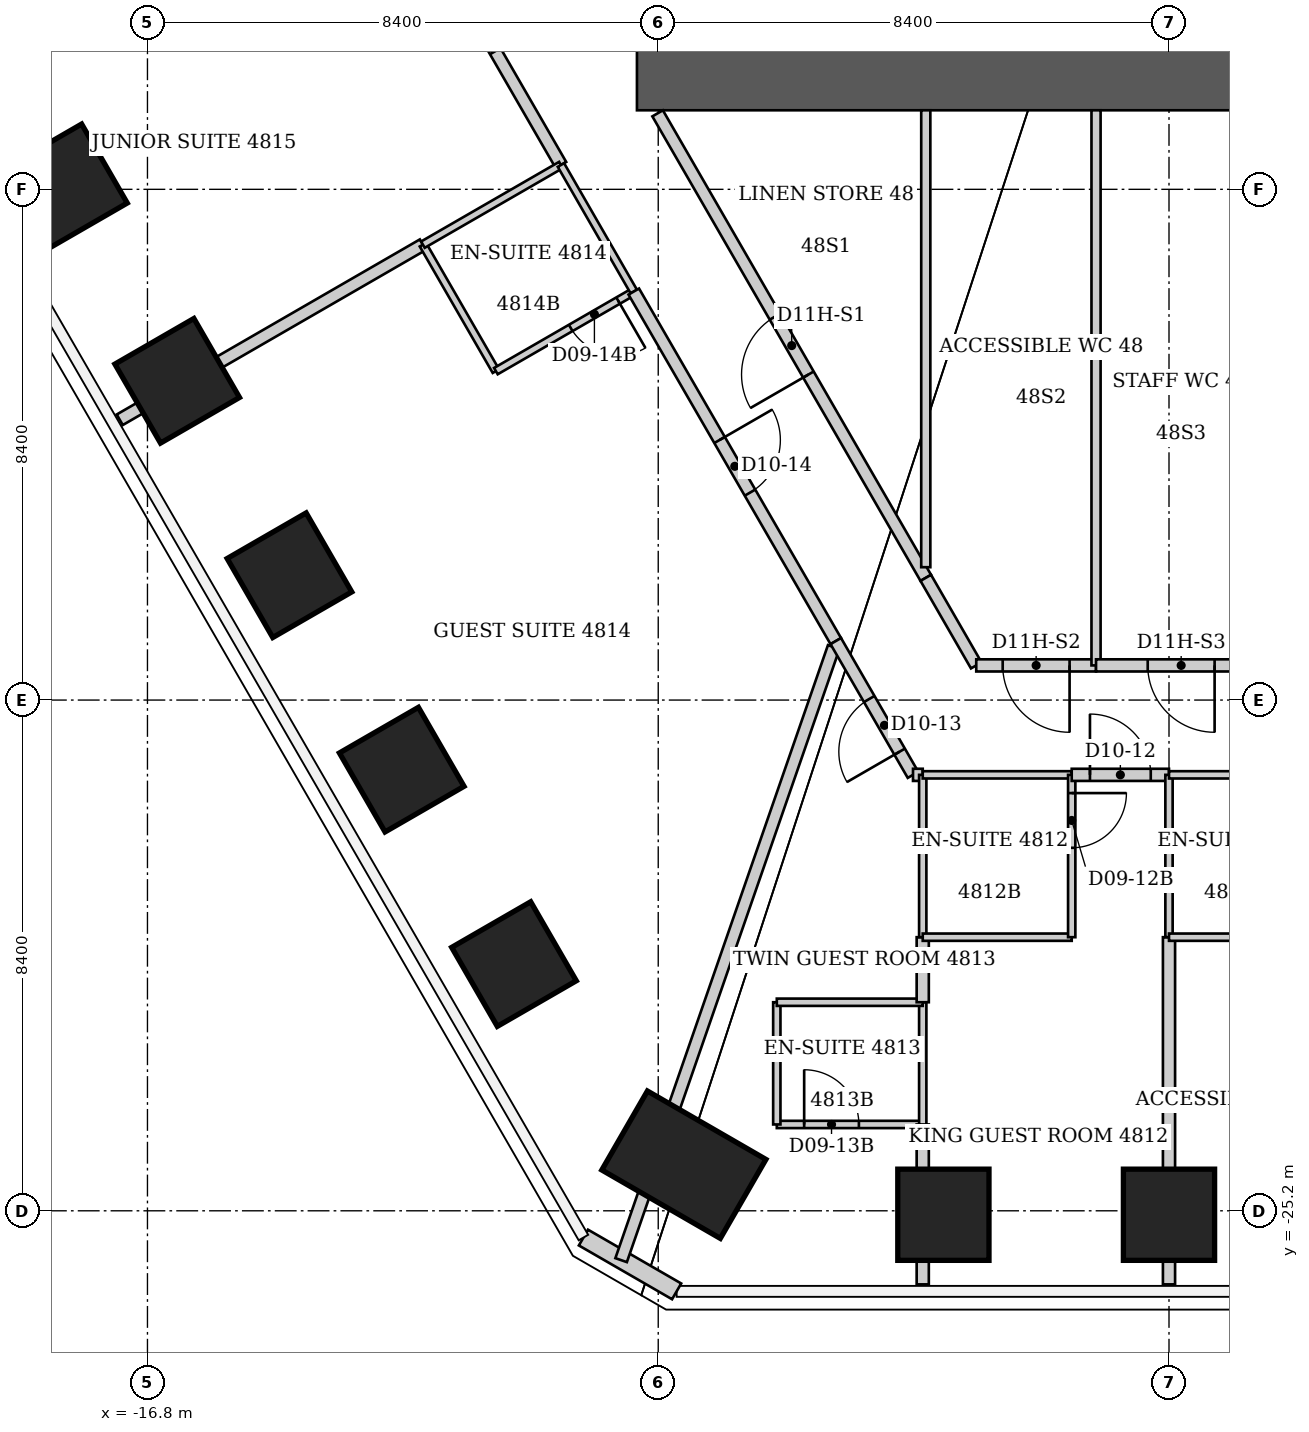
"""IFC4 building model, lengths in metres.
Left out: names, types, materials, properties, quantities, classifications, styles, units other than length and angle.
Written with IfcOpenShell. Run it as: python <this file> out.ifc"""

import sys

from ifc_helpers import new_model, si_unit, direction, frame, frame_2d, origin, origin_2d, place, context, subcontext, project, spatial, rectangle, extrude, element, fill, save


model = new_model("IFC4")
c1 = context("Model", 3, precision=1e-05, world=origin(), true_north=direction((0.0, 1.0)))
c2 = subcontext(c1, "Body", "Model", "MODEL_VIEW")
j1 = project(units=[si_unit("LENGTHUNIT", "METRE"), si_unit("PLANEANGLEUNIT", "RADIAN")], contexts=[c1])
p1 = place(None, origin())
s1 = spatial("IfcSite", under=j1, at=p1, CompositionType="ELEMENT")
p2 = place(p1, origin())
s2 = spatial("IfcBuilding", under=s1, at=p2, CompositionType="ELEMENT")
p3 = place(p2, frame((0.0, 0.0, 194.6)))
s3 = spatial("IfcBuildingStorey", under=s2, at=p3, CompositionType="ELEMENT", Elevation=194.6)
for number, where, z_axis, x_axis in (
    (1, (0.0, -25.265, 0.0), (0.0, 0.0, 1.0), (0.0, -1.0, 0.0)),
    (2, (-3.71, -25.265, 0.0), (0.0, 0.0, 1.0), (0.0, -1.0, 0.0)),
):
    element("IfcColumn", number, at=place(p3, frame(where, z_axis=z_axis, x_axis=x_axis)), inside=s3, PredefinedType="COLUMN", context=c2, shape_type="SweptSolid", body=[
        extrude(rectangle(XDim=1.5, YDim=1.5, at=origin_2d()), origin(), (0.0, 0.0, 1.0), 3.8),
    ])
p4 = place(p3, frame((-7.979, -24.442, 0.0), z_axis=(0.0, 0.0, 1.0), x_axis=(-0.5, -0.866025403784, 0.0)))
e3 = element("IfcColumn", 3, at=p4, inside=s3, PredefinedType="COLUMN", context=c2, shape_type="SweptSolid", body=[
    extrude(rectangle(XDim=1.5, YDim=2.25, at=origin_2d()), origin(), (0.0, 0.0, 1.0), 3.8),
])
for number, where, z_axis, x_axis in (
    (4, (-10.772, -21.142, 0.0), (0.0, 0.0, 1.0), (-0.866, -0.5, 0.0)),
    (5, (-12.618, -17.945, 0.0), (0.0, 0.0, 1.0), (-0.866, -0.5, 0.0)),
    (6, (-14.465, -14.747, 0.0), (0.0, 0.0, 1.0), (-0.866, -0.5, 0.0)),
    (7, (-16.311, -11.549, 0.0), (0.0, 0.0, 1.0), (-0.866, -0.5, 0.0)),
    (8, (-18.157, -8.351, 0.0), (0.0, 0.0, 1.0), (-0.866, -0.5, 0.0)),
):
    element("IfcColumn", number, at=place(p3, frame(where, z_axis=z_axis, x_axis=x_axis)), inside=s3, PredefinedType="COLUMN", context=c2, shape_type="SweptSolid", body=[
        extrude(rectangle(XDim=1.5, YDim=1.5, at=origin_2d()), origin(), (0.0, 0.0, 1.0), 3.8),
    ])
p5 = place(p3, frame((-8.75, -6.6, 0.0), z_axis=(0.0, 0.0, 1.0), x_axis=(1.0, 0.0, 0.0)))
e9 = element("IfcWall", 9, at=p5, inside=s3, PredefinedType="SHEAR", context=c2, shape_type="SweptSolid", body=[
    extrude(rectangle(XDim=17.5, YDim=1.0, at=frame_2d((8.75, 0.0))), origin(), (0.0, 0.0, 1.0), 3.8),
])
p6 = place(p3, frame((-8.097, -26.525, 0.0), z_axis=(0.0, 0.0, 1.0), x_axis=(-0.866036293601, 0.499981137809, 0.0)))
e10 = element("IfcWall", 10, at=p6, inside=s3, PredefinedType="SOLIDWALL", context=c2, shape_type="SweptSolid", body=[
    extrude(rectangle(XDim=1.77, YDim=0.3, at=frame_2d((0.885, 0.0))), origin(), (0.0, 0.0, 1.0), 3.64),
])
p7 = place(p3, frame((-17.256, -12.19, 0.0), z_axis=(0.0, 0.0, 1.0), x_axis=(0.865937714159, 0.500151852138, 0.0)))
e11 = element("IfcWall", 11, at=p7, inside=s3, PredefinedType="PARTITIONING", context=c2, shape_type="SweptSolid", body=[
    extrude(rectangle(XDim=5.758, YDim=0.2, at=frame_2d((2.879, 0.0))), origin(), (0.0, 0.0, 1.0), 3.038),
])
p8 = place(p3, frame((-12.66, -3.39, 0.0), z_axis=(0.0, 0.0, 1.0), x_axis=(0.499755544815, -0.866166494057, 0.0)))
e12 = element("IfcWall", 12, at=p8, inside=s3, PredefinedType="PARTITIONING", context=c2, shape_type="SweptSolid", body=[
    extrude(rectangle(XDim=5.323, YDim=0.2, at=frame_2d((2.661, 0.0))), origin(), (0.0, 0.0, 1.0), 3.64),
])
p9 = place(p8, frame((2.161, 0.0, 0.0)))
e13 = element("IfcOpeningElement", 13, at=p9, cuts=e12, PredefinedType="OPENING", context=c2, shape_type="SweptSolid", body=[
    extrude(rectangle(XDim=1.0, YDim=2.13, at=frame_2d((0.5, 1.065))), frame((0.0, 0.1, 0.0), z_axis=(0.0, -1.0, 0.0), x_axis=(1.0, 0.0, 0.0)), (0.0, 0.0, 1.0), 0.2),
])
p10 = place(p3, frame((-12.27, -9.31, 0.0), z_axis=(0.0, 0.0, 1.0), x_axis=(0.499737123639, -0.866177122335, 0.0)))
e14 = element("IfcWall", 14, at=p10, inside=s3, PredefinedType="PARTITIONING", context=c2, shape_type="SweptSolid", body=[
    extrude(rectangle(XDim=2.401, YDim=0.12, at=frame_2d((1.201, 0.0))), origin(), (0.0, 0.0, 1.0), 3.64),
])
p11 = place(p3, frame((-12.27, -9.31, 0.0), z_axis=(0.0, 0.0, 1.0), x_axis=(0.866114241029, 0.499846097802, 0.0)))
e15 = element("IfcWall", 15, at=p11, inside=s3, PredefinedType="PARTITIONING", context=c2, shape_type="SweptSolid", body=[
    extrude(rectangle(XDim=2.621, YDim=0.12, at=frame_2d((1.311, 0.0))), origin(), (0.0, 0.0, 1.0), 3.038),
])
p12 = place(p3, frame((-11.07, -11.39, 0.0), z_axis=(0.0, 0.0, 1.0), x_axis=(0.866154567199, 0.49977621564, 0.0)))
e16 = element("IfcWall", 16, at=p12, inside=s3, PredefinedType="PARTITIONING", context=c2, shape_type="SweptSolid", body=[
    extrude(rectangle(XDim=2.621, YDim=0.12, at=frame_2d((1.311, 0.0))), origin(), (0.0, 0.0, 1.0), 3.64),
])
p13 = place(p12, frame((1.421, 0.0, 0.0)))
e17 = element("IfcOpeningElement", 17, at=p13, cuts=e16, PredefinedType="OPENING", context=c2, shape_type="SweptSolid", body=[
    extrude(rectangle(XDim=0.9, YDim=2.03, at=frame_2d((0.45, 1.015))), frame((0.0, 0.06, 0.0), z_axis=(0.0, -1.0, 0.0), x_axis=(1.0, 0.0, 0.0)), (0.0, 0.0, 1.0), 0.12),
])
p14 = place(p3, frame((-10.0, -8.0, 0.0), z_axis=(0.0, 0.0, 1.0), x_axis=(0.498862637731, -0.866681065142, 0.0)))
e18 = element("IfcWall", 18, at=p14, inside=s3, PredefinedType="PARTITIONING", context=c2, shape_type="SweptSolid", body=[
    extrude(rectangle(XDim=2.401, YDim=0.12, at=frame_2d((1.201, 0.0))), origin(), (0.0, 0.0, 1.0), 3.64),
])
p15 = place(p3, frame((-9.01, -26.012, 0.0), z_axis=(0.0, 0.0, 1.0), x_axis=(0.327591414813, 0.944819488019, 0.0)))
e19 = element("IfcWall", 19, at=p15, inside=s3, PredefinedType="PARTITIONING", context=c2, shape_type="SweptSolid", body=[
    extrude(rectangle(XDim=10.671, YDim=0.2, at=frame_2d((5.336, 0.0))), origin(), (0.0, 0.0, 1.0), 3.64),
])
p16 = place(p3, frame((-8.802, -10.081, 0.0), z_axis=(0.0, 0.0, 1.0), x_axis=(0.500334569781, -0.865832153643, 0.0)))
e20 = element("IfcWall", 20, at=p16, inside=s3, PredefinedType="PARTITIONING", context=c2, shape_type="SweptSolid", body=[
    extrude(rectangle(XDim=6.64, YDim=0.2, at=frame_2d((3.32, 0.0))), origin(), (0.0, 0.0, 1.0), 3.64),
])
p17 = place(p16, frame((2.82, 0.0, 0.0)))
e21 = element("IfcOpeningElement", 21, at=p17, cuts=e20, PredefinedType="OPENING", context=c2, shape_type="SweptSolid", body=[
    extrude(rectangle(XDim=1.0, YDim=2.13, at=frame_2d((0.5, 1.065))), frame((0.0, 0.1, 0.0), z_axis=(0.0, -1.0, 0.0), x_axis=(1.0, 0.0, 0.0)), (0.0, 0.0, 1.0), 0.2),
])
p18 = place(p3, frame((-6.45, -23.78, 0.0), z_axis=(0.0, 0.0, 1.0), x_axis=(1.0, 0.0, 0.0)))
e22 = element("IfcWall", 22, at=p18, inside=s3, PredefinedType="PARTITIONING", context=c2, shape_type="SweptSolid", body=[
    extrude(rectangle(XDim=2.4, YDim=0.12, at=frame_2d((1.2, 0.0))), origin(), (0.0, 0.0, 1.0), 3.64),
])
p19 = place(p18, frame((0.45, 0.0, 0.0)))
e23 = element("IfcOpeningElement", 23, at=p19, cuts=e22, PredefinedType="OPENING", context=c2, shape_type="SweptSolid", body=[
    extrude(rectangle(XDim=0.9, YDim=2.03, at=frame_2d((0.45, 1.015))), frame((0.0, 0.06, 0.0), z_axis=(0.0, -1.0, 0.0), x_axis=(1.0, 0.0, 0.0)), (0.0, 0.0, 1.0), 0.12),
])
p20 = place(p3, frame((-6.45, -21.77, 0.0), z_axis=(0.0, 0.0, 1.0), x_axis=(0.0, -1.0, 0.0)))
e24 = element("IfcWall", 24, at=p20, inside=s3, PredefinedType="PARTITIONING", context=c2, shape_type="SweptSolid", body=[
    extrude(rectangle(XDim=2.01, YDim=0.12, at=frame_2d((1.005, 0.0))), origin(), (0.0, 0.0, 1.0), 3.64),
])
p21 = place(p3, frame((-5.48, -15.83, 0.0), z_axis=(0.0, 0.0, 1.0), x_axis=(0.499963722229, -0.866046347752, 0.0)))
e25 = element("IfcWall", 25, at=p21, inside=s3, PredefinedType="PARTITIONING", context=c2, shape_type="SweptSolid", body=[
    extrude(rectangle(XDim=2.54, YDim=0.2, at=frame_2d((1.27, 0.0))), origin(), (0.0, 0.0, 1.0), 3.64),
])
p22 = place(p21, frame((1.1, 0.0, 0.0)))
e26 = element("IfcOpeningElement", 26, at=p22, cuts=e25, PredefinedType="OPENING", context=c2, shape_type="SweptSolid", body=[
    extrude(rectangle(XDim=1.0, YDim=2.13, at=frame_2d((0.5, 1.065))), frame((0.0, 0.1, 0.0), z_axis=(0.0, -1.0, 0.0), x_axis=(1.0, 0.0, 0.0)), (0.0, 0.0, 1.0), 0.2),
])
p23 = place(p3, frame((-4.21, -18.03, 0.0), z_axis=(0.0, 0.0, 1.0), x_axis=(1.0, 0.0, 0.0)))
e27 = element("IfcWall", 27, at=p23, inside=s3, PredefinedType="PARTITIONING", context=c2, shape_type="SweptSolid", body=[
    extrude(rectangle(XDim=0.16, YDim=0.2, at=frame_2d((0.08, 0.0))), origin(), (0.0, 0.0, 1.0), 3.64),
])
p24 = place(p3, frame((-4.05, -26.41, 0.0), z_axis=(0.0, 0.0, 1.0), x_axis=(0.0, 1.0, 0.0)))
e28 = element("IfcWall", 28, at=p24, inside=s3, PredefinedType="PARTITIONING", context=c2, shape_type="SweptSolid", body=[
    extrude(rectangle(XDim=2.63, YDim=0.2, at=frame_2d((1.315, 0.0))), origin(), (0.0, 0.0, 1.0), 3.64),
])
p25 = place(p3, frame((-4.05, -23.78, 0.0), z_axis=(0.0, 0.0, 1.0), x_axis=(0.0, 1.0, 0.0)))
e29 = element("IfcWall", 29, at=p25, inside=s3, PredefinedType="PARTITIONING", context=c2, shape_type="SweptSolid", body=[
    extrude(rectangle(XDim=2.01, YDim=0.12, at=frame_2d((1.005, 0.0))), origin(), (0.0, 0.0, 1.0), 3.64),
])
p26 = place(p3, frame((-4.05, -21.77, 0.0), z_axis=(0.0, 0.0, 1.0), x_axis=(-1.0, 0.0, 0.0)))
e30 = element("IfcWall", 30, at=p26, inside=s3, PredefinedType="PARTITIONING", context=c2, shape_type="SweptSolid", body=[
    extrude(rectangle(XDim=2.4, YDim=0.12, at=frame_2d((1.2, 0.0))), origin(), (0.0, 0.0, 1.0), 3.64),
])
p27 = place(p3, frame((-4.05, -21.77, 0.0), z_axis=(0.0, 0.0, 1.0), x_axis=(0.0, 1.0, 0.0)))
e31 = element("IfcWall", 31, at=p27, inside=s3, PredefinedType="PARTITIONING", context=c2, shape_type="SweptSolid", body=[
    extrude(rectangle(XDim=1.07, YDim=0.2, at=frame_2d((0.535, 0.0))), origin(), (0.0, 0.0, 1.0), 3.64),
])
p28 = place(p3, frame((-4.05, -20.7, 0.0), z_axis=(0.0, 0.0, 1.0), x_axis=(0.0, 1.0, 0.0)))
e32 = element("IfcWall", 32, at=p28, inside=s3, PredefinedType="PARTITIONING", context=c2, shape_type="SweptSolid", body=[
    extrude(rectangle(XDim=2.67, YDim=0.12, at=frame_2d((1.335, 0.0))), origin(), (0.0, 0.0, 1.0), 3.64),
])
for number, where, z_axis, x_axis in (
    (33, (-4.05, -20.7, 0.0), (0.0, 0.0, 1.0), (1.0, 0.0, 0.0)),
    (34, (-4.05, -18.03, 0.0), (0.0, 0.0, 1.0), (1.0, 0.0, 0.0)),
):
    element("IfcWall", number, at=place(p3, frame(where, z_axis=z_axis, x_axis=x_axis)), inside=s3, PredefinedType="PARTITIONING", context=c2, shape_type="SweptSolid", body=[
        extrude(rectangle(XDim=2.45, YDim=0.12, at=frame_2d((1.225, 0.0))), origin(), (0.0, 0.0, 1.0), 3.64),
    ])
p29 = place(p3, frame((-4.0, -14.79, 0.0), z_axis=(0.0, 0.0, 1.0), x_axis=(-0.499916512745, 0.866073599808, 0.0)))
e35 = element("IfcWall", 35, at=p29, inside=s3, PredefinedType="PARTITIONING", context=c2, shape_type="SweptSolid", body=[
    extrude(rectangle(XDim=8.821, YDim=0.2, at=frame_2d((4.411, 0.0))), origin(), (0.0, 0.0, 1.0), 3.64),
])
p30 = place(p29, frame((3.861, 0.0, 0.0)))
e36 = element("IfcOpeningElement", 36, at=p30, cuts=e35, PredefinedType="OPENING", context=c2, shape_type="SweptSolid", body=[
    extrude(rectangle(XDim=1.1, YDim=2.2, at=frame_2d((0.55, 1.1))), frame((0.0, 0.1, 0.0), z_axis=(0.0, -1.0, 0.0), x_axis=(1.0, 0.0, 0.0)), (0.0, 0.0, 1.0), 0.2),
])
p31 = place(p3, frame((-4.0, -7.1, 0.0), z_axis=(0.0, 0.0, 1.0), x_axis=(0.0, -1.0, 0.0)))
e37 = element("IfcWall", 37, at=p31, inside=s3, PredefinedType="PARTITIONING", context=c2, shape_type="SweptSolid", body=[
    extrude(rectangle(XDim=7.515, YDim=0.15, at=frame_2d((3.757, 0.0))), origin(), (0.0, 0.0, 1.0), 3.64),
])
p32 = place(p3, frame((-3.17, -16.23, 0.0), z_axis=(0.0, 0.0, 1.0), x_axis=(-0.499425709803, 0.866356716594, 0.0)))
e38 = element("IfcWall", 38, at=p32, inside=s3, PredefinedType="PARTITIONING", context=c2, shape_type="SweptSolid", body=[
    extrude(rectangle(XDim=1.662, YDim=0.2, at=frame_2d((0.831, 0.0))), origin(), (0.0, 0.0, 1.0), 3.64),
])
p33 = place(p3, frame((-1.6, -20.7, 0.0), z_axis=(0.0, 0.0, 1.0), x_axis=(0.0, 1.0, 0.0)))
e39 = element("IfcWall", 39, at=p33, inside=s3, PredefinedType="PARTITIONING", context=c2, shape_type="SweptSolid", body=[
    extrude(rectangle(XDim=2.67, YDim=0.12, at=frame_2d((1.335, 0.0))), origin(), (0.0, 0.0, 1.0), 3.64),
])
p34 = place(p33, frame((1.47, 0.0, 0.0)))
e40 = element("IfcOpeningElement", 40, at=p34, cuts=e39, PredefinedType="OPENING", context=c2, shape_type="SweptSolid", body=[
    extrude(rectangle(XDim=0.9, YDim=2.03, at=frame_2d((0.45, 1.015))), frame((0.0, 0.06, 0.0), z_axis=(0.0, -1.0, 0.0), x_axis=(1.0, 0.0, 0.0)), (0.0, 0.0, 1.0), 0.12),
])
p35 = place(p3, frame((-1.6, -18.03, 0.0), z_axis=(0.0, 0.0, 1.0), x_axis=(1.0, 0.0, 0.0)))
e41 = element("IfcWall", 41, at=p35, inside=s3, PredefinedType="PARTITIONING", context=c2, shape_type="SweptSolid", body=[
    extrude(rectangle(XDim=1.6, YDim=0.2, at=frame_2d((0.8, 0.0))), origin(), (0.0, 0.0, 1.0), 3.64),
])
p36 = place(p35, frame((0.3, 0.0, 0.0)))
e42 = element("IfcOpeningElement", 42, at=p36, cuts=e41, PredefinedType="OPENING", context=c2, shape_type="SweptSolid", body=[
    extrude(rectangle(XDim=1.0, YDim=2.13, at=frame_2d((0.5, 1.065))), frame((0.0, 0.1, 0.0), z_axis=(0.0, -1.0, 0.0), x_axis=(1.0, 0.0, 0.0)), (0.0, 0.0, 1.0), 0.2),
])
p37 = place(p3, frame((-1.2, -16.23, 0.0), z_axis=(0.0, 0.0, 1.0), x_axis=(-1.0, 0.0, 0.0)))
e43 = element("IfcWall", 43, at=p37, inside=s3, PredefinedType="PARTITIONING", context=c2, shape_type="SweptSolid", body=[
    extrude(rectangle(XDim=1.97, YDim=0.2, at=frame_2d((0.985, 0.0))), origin(), (0.0, 0.0, 1.0), 3.64),
])
p38 = place(p37, frame((0.435, 0.0, 0.0)))
e44 = element("IfcOpeningElement", 44, at=p38, cuts=e43, PredefinedType="OPENING", context=c2, shape_type="SweptSolid", body=[
    extrude(rectangle(XDim=1.1, YDim=2.2, at=frame_2d((0.55, 1.1))), frame((0.0, 0.1, 0.0), z_axis=(0.0, -1.0, 0.0), x_axis=(1.0, 0.0, 0.0)), (0.0, 0.0, 1.0), 0.2),
])
p39 = place(p3, frame((-1.2, -7.1, 0.0), z_axis=(0.0, 0.0, 1.0), x_axis=(0.0, -1.0, 0.0)))
e45 = element("IfcWall", 45, at=p39, inside=s3, PredefinedType="PARTITIONING", context=c2, shape_type="SweptSolid", body=[
    extrude(rectangle(XDim=9.13, YDim=0.15, at=frame_2d((4.565, 0.0))), origin(), (0.0, 0.0, 1.0), 3.64),
])
p40 = place(p3, frame((0.0, -26.41, 0.0), z_axis=(0.0, 0.0, 1.0), x_axis=(0.0, 1.0, 0.0)))
e46 = element("IfcWall", 46, at=p40, inside=s3, PredefinedType="PARTITIONING", context=c2, shape_type="SweptSolid", body=[
    extrude(rectangle(XDim=5.71, YDim=0.2, at=frame_2d((2.855, 0.0))), origin(), (0.0, 0.0, 1.0), 2.726),
])
p41 = place(p3, frame((0.0, -20.7, 0.0), z_axis=(0.0, 0.0, 1.0), x_axis=(0.0, 1.0, 0.0)))
e47 = element("IfcWall", 47, at=p41, inside=s3, PredefinedType="PARTITIONING", context=c2, shape_type="SweptSolid", body=[
    extrude(rectangle(XDim=2.67, YDim=0.12, at=frame_2d((1.335, 0.0))), origin(), (0.0, 0.0, 1.0), 2.726),
])
for number, where, z_axis, x_axis in (
    (48, (0.0, -20.7, 0.0), (0.0, 0.0, 1.0), (1.0, 0.0, 0.0)),
    (49, (0.0, -18.03, 0.0), (0.0, 0.0, 1.0), (1.0, 0.0, 0.0)),
):
    element("IfcWall", number, at=place(p3, frame(where, z_axis=z_axis, x_axis=x_axis)), inside=s3, PredefinedType="PARTITIONING", context=c2, shape_type="SweptSolid", body=[
        extrude(rectangle(XDim=2.45, YDim=0.12, at=frame_2d((1.225, 0.0))), origin(), (0.0, 0.0, 1.0), 3.64),
    ])
p42 = place(p3, frame((1.6, -16.23, 0.0), z_axis=(0.0, 0.0, 1.0), x_axis=(-1.0, 0.0, 0.0)))
e50 = element("IfcWall", 50, at=p42, inside=s3, PredefinedType="PARTITIONING", context=c2, shape_type="SweptSolid", body=[
    extrude(rectangle(XDim=2.8, YDim=0.2, at=frame_2d((1.4, 0.0))), origin(), (0.0, 0.0, 1.0), 3.64),
])
p43 = place(p42, frame((0.85, 0.0, 0.0)))
e51 = element("IfcOpeningElement", 51, at=p43, cuts=e50, PredefinedType="OPENING", context=c2, shape_type="SweptSolid", body=[
    extrude(rectangle(XDim=1.1, YDim=2.2, at=frame_2d((0.55, 1.1))), frame((0.0, 0.1, 0.0), z_axis=(0.0, -1.0, 0.0), x_axis=(1.0, 0.0, 0.0)), (0.0, 0.0, 1.0), 0.2),
])
p44 = place(p36, origin())
e52 = element("IfcDoor", 52, at=p44, inside=s3, OperationType="SINGLE_SWING_LEFT", PredefinedType="DOOR", context=c2, shape_type="SweptSolid", body=[
    extrude(rectangle(XDim=1.0, YDim=2.13, at=frame_2d((0.5, 1.065))), frame((0.0, 0.025, 0.0), z_axis=(0.0, -1.0, 0.0), x_axis=(1.0, 0.0, 0.0)), (0.0, 0.0, 1.0), 0.05),
])
fill(e42, e52)
p45 = place(p34, origin())
e53 = element("IfcDoor", 53, at=p45, inside=s3, OperationType="SINGLE_SWING_RIGHT", PredefinedType="DOOR", context=c2, shape_type="SweptSolid", body=[
    extrude(rectangle(XDim=0.9, YDim=2.03, at=frame_2d((0.45, 1.015))), frame((0.0, 0.025, 0.0), z_axis=(0.0, -1.0, 0.0), x_axis=(1.0, 0.0, 0.0)), (0.0, 0.0, 1.0), 0.05),
])
fill(e40, e53)
p46 = place(p22, origin())
e54 = element("IfcDoor", 54, at=p46, inside=s3, OperationType="SINGLE_SWING_RIGHT", PredefinedType="DOOR", context=c2, shape_type="SweptSolid", body=[
    extrude(rectangle(XDim=1.0, YDim=2.13, at=frame_2d((0.5, 1.065))), frame((0.0, 0.025, 0.0), z_axis=(0.0, -1.0, 0.0), x_axis=(1.0, 0.0, 0.0)), (0.0, 0.0, 1.0), 0.05),
])
fill(e26, e54)
p47 = place(p19, origin())
e55 = element("IfcDoor", 55, at=p47, inside=s3, OperationType="SINGLE_SWING_LEFT", PredefinedType="DOOR", context=c2, shape_type="SweptSolid", body=[
    extrude(rectangle(XDim=0.9, YDim=2.03, at=frame_2d((0.45, 1.015))), frame((0.0, 0.025, 0.0), z_axis=(0.0, -1.0, 0.0), x_axis=(1.0, 0.0, 0.0)), (0.0, 0.0, 1.0), 0.05),
])
fill(e23, e55)
p48 = place(p17, origin())
e56 = element("IfcDoor", 56, at=p48, inside=s3, OperationType="SINGLE_SWING_LEFT", PredefinedType="DOOR", context=c2, shape_type="SweptSolid", body=[
    extrude(rectangle(XDim=1.0, YDim=2.13, at=frame_2d((0.5, 1.065))), frame((0.0, 0.025, 0.0), z_axis=(0.0, -1.0, 0.0), x_axis=(1.0, 0.0, 0.0)), (0.0, 0.0, 1.0), 0.05),
])
fill(e21, e56)
p49 = place(p13, origin())
e57 = element("IfcDoor", 57, at=p49, inside=s3, OperationType="SINGLE_SWING_RIGHT", PredefinedType="DOOR", context=c2, shape_type="SweptSolid", body=[
    extrude(rectangle(XDim=0.9, YDim=2.03, at=frame_2d((0.45, 1.015))), frame((0.0, 0.025, 0.0), z_axis=(0.0, -1.0, 0.0), x_axis=(1.0, 0.0, 0.0)), (0.0, 0.0, 1.0), 0.05),
])
fill(e17, e57)
p50 = place(p30, origin())
e58 = element("IfcDoor", 58, at=p50, inside=s3, OperationType="SINGLE_SWING_LEFT", PredefinedType="DOOR", context=c2, shape_type="SweptSolid", body=[
    extrude(rectangle(XDim=1.1, YDim=2.2, at=frame_2d((0.55, 1.1))), frame((0.0, 0.025, 0.0), z_axis=(0.0, -1.0, 0.0), x_axis=(1.0, 0.0, 0.0)), (0.0, 0.0, 1.0), 0.05),
])
fill(e36, e58)
p51 = place(p38, origin())
e59 = element("IfcDoor", 59, at=p51, inside=s3, OperationType="SINGLE_SWING_LEFT", PredefinedType="DOOR", context=c2, shape_type="SweptSolid", body=[
    extrude(rectangle(XDim=1.1, YDim=2.2, at=frame_2d((0.55, 1.1))), frame((0.0, 0.025, 0.0), z_axis=(0.0, -1.0, 0.0), x_axis=(1.0, 0.0, 0.0)), (0.0, 0.0, 1.0), 0.05),
])
fill(e44, e59)
p52 = place(p43, origin())
e60 = element("IfcDoor", 60, at=p52, inside=s3, OperationType="SINGLE_SWING_LEFT", PredefinedType="DOOR", context=c2, shape_type="SweptSolid", body=[
    extrude(rectangle(XDim=1.1, YDim=2.2, at=frame_2d((0.55, 1.1))), frame((0.0, 0.025, 0.0), z_axis=(0.0, -1.0, 0.0), x_axis=(1.0, 0.0, 0.0)), (0.0, 0.0, 1.0), 0.05),
])
fill(e51, e60)
save(model, sys.argv[1])
